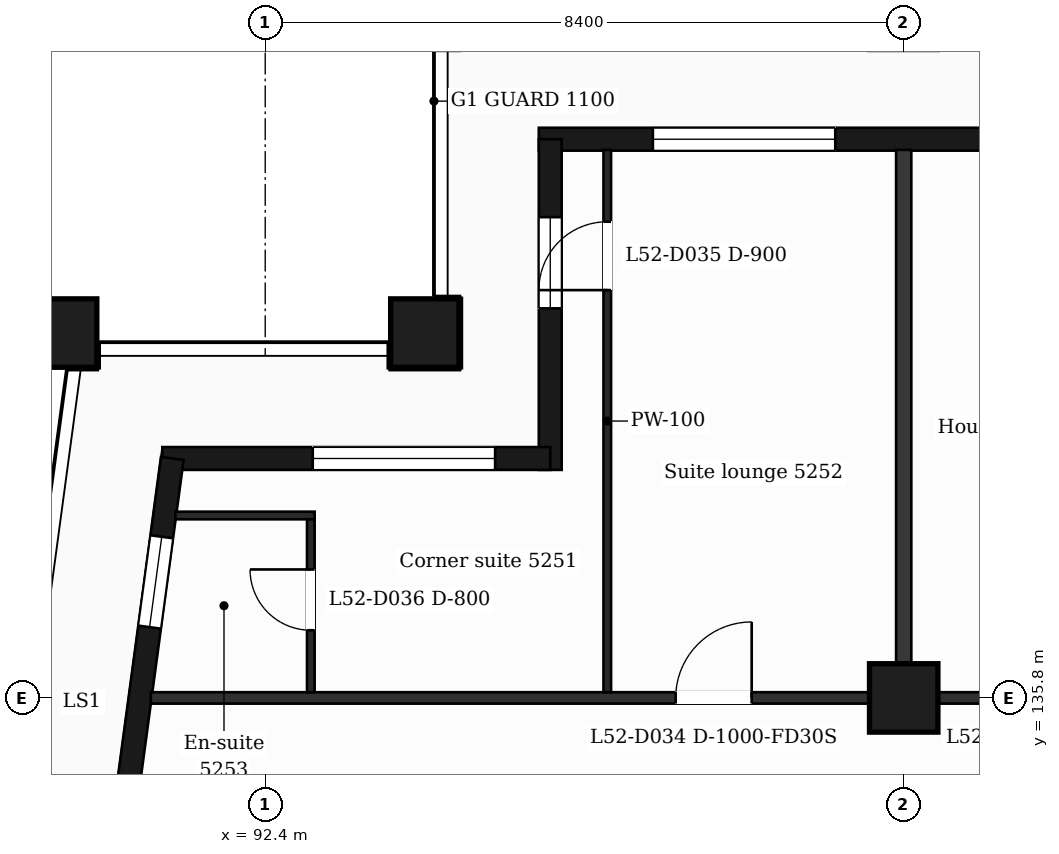
"""IFC4 building model, lengths in metres.
Left out: names, types, materials, properties, quantities, classifications, styles, units other than length and angle.
Written with IfcOpenShell. Run it as: python <this file> out.ifc"""

import sys

from ifc_helpers import new_model, si_unit, direction, frame, frame_2d, origin, origin_2d, place, context, subcontext, project, spatial, rectangle, extrude, element, fill, save


model = new_model("IFC4")
c1 = context("Model", 3, precision=1e-05, world=origin(), true_north=direction((0.0, 1.0)))
c2 = subcontext(c1, "Body", "Model", "MODEL_VIEW")
j1 = project(units=[si_unit("LENGTHUNIT", "METRE"), si_unit("PLANEANGLEUNIT", "RADIAN")], contexts=[c1])
p1 = place(None, origin())
s1 = spatial("IfcSite", under=j1, at=p1, CompositionType="ELEMENT")
p2 = place(p1, origin())
s2 = spatial("IfcBuilding", under=s1, at=p2, CompositionType="ELEMENT")
p3 = place(p2, frame((0.0, 0.0, 217.0)))
s3 = spatial("IfcBuildingStorey", under=s2, at=p3, CompositionType="ELEMENT", Elevation=217.0)
for number, where, z_axis, x_axis in (
    (1, (94.5, 140.6, 0.0), (0.0, 0.0, 1.0), (1.0, 0.0, 0.0)),
    (2, (89.735, 140.6, 0.0), (0.0, 0.0, 1.0), (1.0, 0.0, 0.0)),
    (3, (100.8, 135.8, 0.0), (0.0, 0.0, 1.0), (1.0, 0.0, 0.0)),
):
    element("IfcColumn", number, at=place(p3, frame(where, z_axis=z_axis, x_axis=x_axis)), inside=s3, PredefinedType="COLUMN", context=c2, shape_type="SweptSolid", body=[
        extrude(rectangle(XDim=0.9, YDim=0.9, at=origin_2d()), origin(), (0.0, 0.0, 1.0), 3.7),
    ])
p4 = place(p3, frame((110.4, 143.15, 0.0), z_axis=(0.0, 0.0, 1.0), x_axis=(-1.0, 0.0, 0.0)))
e4 = element("IfcWall", 4, at=p4, inside=s3, PredefinedType="SOLIDWALL", context=c2, shape_type="SweptSolid", body=[
    extrude(rectangle(XDim=14.4, YDim=0.3, at=frame_2d((7.2, 0.0))), origin(), (0.0, 0.0, 1.0), 3.38),
])
p5 = place(p4, frame((2.7, 0.0, 0.9)))
e5 = element("IfcOpeningElement", 5, at=p5, cuts=e4, PredefinedType="OPENING", context=c2, shape_type="SweptSolid", body=[
    extrude(rectangle(XDim=1.2, YDim=2.1, at=frame_2d((0.6, 1.05))), frame((0.0, 0.16, 0.0), z_axis=(0.0, -1.0, 0.0), x_axis=(1.0, 0.0, 0.0)), (0.0, 0.0, 1.0), 0.32),
])
p6 = place(p4, frame((6.9, 0.0, 0.0)))
e6 = element("IfcOpeningElement", 6, at=p6, cuts=e4, PredefinedType="OPENING", context=c2, shape_type="SweptSolid", body=[
    extrude(rectangle(XDim=1.2, YDim=2.4, at=frame_2d((0.6, 1.2))), frame((0.0, 0.16, 0.0), z_axis=(0.0, -1.0, 0.0), x_axis=(1.0, 0.0, 0.0)), (0.0, 0.0, 1.0), 0.32),
])
p7 = place(p4, frame((10.5, 0.0, 0.9)))
e7 = element("IfcOpeningElement", 7, at=p7, cuts=e4, PredefinedType="OPENING", context=c2, shape_type="SweptSolid", body=[
    extrude(rectangle(XDim=2.4, YDim=2.1, at=frame_2d((1.2, 1.05))), frame((0.0, 0.16, 0.0), z_axis=(0.0, -1.0, 0.0), x_axis=(1.0, 0.0, 0.0)), (0.0, 0.0, 1.0), 0.32),
])
p8 = place(p3, frame((96.15, 143.15, 0.0), z_axis=(0.0, 0.0, 1.0), x_axis=(0.0, -1.0, 0.0)))
e8 = element("IfcWall", 8, at=p8, inside=s3, PredefinedType="SOLIDWALL", context=c2, shape_type="SweptSolid", body=[
    extrude(rectangle(XDim=4.35, YDim=0.3, at=frame_2d((2.175, 0.0))), origin(), (0.0, 0.0, 1.0), 3.38),
])
p9 = place(p8, frame((1.025, 0.0, 0.9)))
e9 = element("IfcOpeningElement", 9, at=p9, cuts=e8, PredefinedType="OPENING", context=c2, shape_type="SweptSolid", body=[
    extrude(rectangle(XDim=1.2, YDim=2.1, at=frame_2d((0.6, 1.05))), frame((0.0, 0.16, 0.0), z_axis=(0.0, -1.0, 0.0), x_axis=(1.0, 0.0, 0.0)), (0.0, 0.0, 1.0), 0.32),
])
p10 = place(p3, frame((96.15, 138.95, 0.0), z_axis=(0.0, 0.0, 1.0), x_axis=(-1.0, 0.0, 0.0)))
e10 = element("IfcWall", 10, at=p10, inside=s3, PredefinedType="SOLIDWALL", context=c2, shape_type="SweptSolid", body=[
    extrude(rectangle(XDim=5.104, YDim=0.3, at=frame_2d((2.552, 0.0))), origin(), (0.0, 0.0, 1.0), 3.38),
])
p11 = place(p10, frame((0.725, 0.0, 0.9)))
e11 = element("IfcOpeningElement", 11, at=p11, cuts=e10, PredefinedType="OPENING", context=c2, shape_type="SweptSolid", body=[
    extrude(rectangle(XDim=2.4, YDim=2.1, at=frame_2d((1.2, 1.05))), frame((0.0, 0.16, 0.0), z_axis=(0.0, -1.0, 0.0), x_axis=(1.0, 0.0, 0.0)), (0.0, 0.0, 1.0), 0.32),
])
p12 = place(p3, frame((91.177, 138.95, 0.0), z_axis=(0.0, 0.0, 1.0), x_axis=(-0.133426664613, -0.991058689065, 0.0)))
e12 = element("IfcWall", 12, at=p12, inside=s3, PredefinedType="SOLIDWALL", context=c2, shape_type="SweptSolid", body=[
    extrude(rectangle(XDim=6.609, YDim=0.3, at=frame_2d((3.305, 0.0))), origin(), (0.0, 0.0, 1.0), 3.38),
])
p13 = place(p12, frame((1.039, 0.0, 0.9)))
e13 = element("IfcOpeningElement", 13, at=p13, cuts=e12, PredefinedType="OPENING", context=c2, shape_type="SweptSolid", body=[
    extrude(rectangle(XDim=1.2, YDim=2.1, at=frame_2d((0.6, 1.05))), frame((0.0, 0.16, 0.0), z_axis=(0.0, -1.0, 0.0), x_axis=(1.0, 0.0, 0.0)), (0.0, 0.0, 1.0), 0.32),
])
p14 = place(p12, frame((4.294, 0.0, 0.0)))
e14 = element("IfcOpeningElement", 14, at=p14, cuts=e12, PredefinedType="OPENING", context=c2, shape_type="SweptSolid", body=[
    extrude(rectangle(XDim=1.2, YDim=2.4, at=frame_2d((0.6, 1.2))), frame((0.0, 0.16, 0.0), z_axis=(0.0, -1.0, 0.0), x_axis=(1.0, 0.0, 0.0)), (0.0, 0.0, 1.0), 0.32),
])
p15 = place(p3, frame((90.895, 135.8, 0.0), z_axis=(0.0, 0.0, 1.0), x_axis=(1.0, 0.0, 0.0)))
e15 = element("IfcWall", 15, at=p15, inside=s3, PredefinedType="PARTITIONING", context=c2, shape_type="SweptSolid", body=[
    extrude(rectangle(XDim=45.011, YDim=0.15, at=frame_2d((22.505, 0.0))), origin(), (0.0, 0.0, 1.0), 3.38),
])
p16 = place(p15, frame((6.906, 0.0, 0.0)))
e16 = element("IfcOpeningElement", 16, at=p16, cuts=e15, PredefinedType="OPENING", context=c2, shape_type="SweptSolid", body=[
    extrude(rectangle(XDim=1.0, YDim=2.1, at=frame_2d((0.5, 1.05))), frame((0.0, 0.085, 0.0), z_axis=(0.0, -1.0, 0.0), x_axis=(1.0, 0.0, 0.0)), (0.0, 0.0, 1.0), 0.17),
])
p17 = place(p15, frame((11.531, 0.0, 0.0)))
e17 = element("IfcOpeningElement", 17, at=p17, cuts=e15, PredefinedType="OPENING", context=c2, shape_type="SweptSolid", body=[
    extrude(rectangle(XDim=0.95, YDim=2.1, at=frame_2d((0.475, 1.05))), frame((0.0, 0.085, 0.0), z_axis=(0.0, -1.0, 0.0), x_axis=(1.0, 0.0, 0.0)), (0.0, 0.0, 1.0), 0.17),
])
p18 = place(p15, frame((16.667, 0.0, 0.0)))
e18 = element("IfcOpeningElement", 18, at=p18, cuts=e15, PredefinedType="OPENING", context=c2, shape_type="SweptSolid", body=[
    extrude(rectangle(XDim=0.95, YDim=2.1, at=frame_2d((0.475, 1.05))), frame((0.0, 0.085, 0.0), z_axis=(0.0, -1.0, 0.0), x_axis=(1.0, 0.0, 0.0)), (0.0, 0.0, 1.0), 0.17),
])
p19 = place(p15, frame((21.281, 0.0, 0.0)))
e19 = element("IfcOpeningElement", 19, at=p19, cuts=e15, PredefinedType="OPENING", context=c2, shape_type="SweptSolid", body=[
    extrude(rectangle(XDim=0.95, YDim=2.1, at=frame_2d((0.475, 1.05))), frame((0.0, 0.085, 0.0), z_axis=(0.0, -1.0, 0.0), x_axis=(1.0, 0.0, 0.0)), (0.0, 0.0, 1.0), 0.17),
])
p20 = place(p15, frame((28.73, 0.0, 0.0)))
e20 = element("IfcOpeningElement", 20, at=p20, cuts=e15, PredefinedType="OPENING", context=c2, shape_type="SweptSolid", body=[
    extrude(rectangle(XDim=1.0, YDim=2.1, at=frame_2d((0.5, 1.05))), frame((0.0, 0.085, 0.0), z_axis=(0.0, -1.0, 0.0), x_axis=(1.0, 0.0, 0.0)), (0.0, 0.0, 1.0), 0.17),
])
p21 = place(p15, frame((39.814, 0.0, 0.0)))
e21 = element("IfcOpeningElement", 21, at=p21, cuts=e15, PredefinedType="OPENING", context=c2, shape_type="SweptSolid", body=[
    extrude(rectangle(XDim=0.95, YDim=2.1, at=frame_2d((0.475, 1.05))), frame((0.0, 0.085, 0.0), z_axis=(0.0, -1.0, 0.0), x_axis=(1.0, 0.0, 0.0)), (0.0, 0.0, 1.0), 0.17),
])
p22 = place(p3, frame((91.218, 138.2, 0.0), z_axis=(0.0, 0.0, 1.0), x_axis=(1.0, 0.0, 0.0)))
e22 = element("IfcWall", 22, at=p22, inside=s3, PredefinedType="PARTITIONING", context=c2, shape_type="SweptSolid", body=[
    extrude(rectangle(XDim=1.832, YDim=0.1, at=frame_2d((0.916, 0.0))), origin(), (0.0, 0.0, 1.0), 3.38),
])
p23 = place(p3, frame((93.0, 135.875, 0.0), z_axis=(0.0, 0.0, 1.0), x_axis=(0.0, 1.0, 0.0)))
e23 = element("IfcWall", 23, at=p23, inside=s3, PredefinedType="PARTITIONING", context=c2, shape_type="SweptSolid", body=[
    extrude(rectangle(XDim=2.275, YDim=0.1, at=frame_2d((1.137, 0.0))), origin(), (0.0, 0.0, 1.0), 3.38),
])
p24 = place(p23, frame((0.815, 0.0, 0.0)))
e24 = element("IfcOpeningElement", 24, at=p24, cuts=e23, PredefinedType="OPENING", context=c2, shape_type="SweptSolid", body=[
    extrude(rectangle(XDim=0.8, YDim=2.1, at=frame_2d((0.4, 1.05))), frame((0.0, 0.06, 0.0), z_axis=(0.0, -1.0, 0.0), x_axis=(1.0, 0.0, 0.0)), (0.0, 0.0, 1.0), 0.12),
])
p25 = place(p3, frame((96.9, 135.875, 0.0), z_axis=(0.0, 0.0, 1.0), x_axis=(0.0, 1.0, 0.0)))
e25 = element("IfcWall", 25, at=p25, inside=s3, PredefinedType="PARTITIONING", context=c2, shape_type="SweptSolid", body=[
    extrude(rectangle(XDim=7.135, YDim=0.1, at=frame_2d((3.567, 0.0))), origin(), (0.0, 0.0, 1.0), 3.38),
])
p26 = place(p25, frame((5.29, 0.0, 0.0)))
e26 = element("IfcOpeningElement", 26, at=p26, cuts=e25, PredefinedType="OPENING", context=c2, shape_type="SweptSolid", body=[
    extrude(rectangle(XDim=0.9, YDim=2.1, at=frame_2d((0.45, 1.05))), frame((0.0, 0.06, 0.0), z_axis=(0.0, -1.0, 0.0), x_axis=(1.0, 0.0, 0.0)), (0.0, 0.0, 1.0), 0.12),
])
p27 = place(p3, frame((100.8, 135.875, 0.0), z_axis=(0.0, 0.0, 1.0), x_axis=(0.0, 1.0, 0.0)))
e27 = element("IfcWall", 27, at=p27, inside=s3, PredefinedType="PARTITIONING", context=c2, shape_type="SweptSolid", body=[
    extrude(rectangle(XDim=7.135, YDim=0.2, at=frame_2d((3.567, 0.0))), origin(), (0.0, 0.0, 1.0), 3.38),
])
p28 = place(p7, origin())
e28 = element("IfcWindow", 28, at=p28, inside=s3, PartitioningType="SINGLE_PANEL", PredefinedType="WINDOW", context=c2, shape_type="SweptSolid", body=[
    extrude(rectangle(XDim=2.4, YDim=2.1, at=frame_2d((1.2, 1.05))), frame((0.0, 0.03, 0.0), z_axis=(0.0, -1.0, 0.0), x_axis=(1.0, 0.0, 0.0)), (0.0, 0.0, 1.0), 0.06),
])
fill(e7, e28)
p29 = place(p9, origin())
e29 = element("IfcWindow", 29, at=p29, inside=s3, PartitioningType="SINGLE_PANEL", PredefinedType="WINDOW", context=c2, shape_type="SweptSolid", body=[
    extrude(rectangle(XDim=1.2, YDim=2.1, at=frame_2d((0.6, 1.05))), frame((0.0, 0.03, 0.0), z_axis=(0.0, -1.0, 0.0), x_axis=(1.0, 0.0, 0.0)), (0.0, 0.0, 1.0), 0.06),
])
fill(e9, e29)
p30 = place(p11, origin())
e30 = element("IfcWindow", 30, at=p30, inside=s3, PartitioningType="SINGLE_PANEL", PredefinedType="WINDOW", context=c2, shape_type="SweptSolid", body=[
    extrude(rectangle(XDim=2.4, YDim=2.1, at=frame_2d((1.2, 1.05))), frame((0.0, 0.03, 0.0), z_axis=(0.0, -1.0, 0.0), x_axis=(1.0, 0.0, 0.0)), (0.0, 0.0, 1.0), 0.06),
])
fill(e11, e30)
p31 = place(p13, origin())
e31 = element("IfcWindow", 31, at=p31, inside=s3, PartitioningType="SINGLE_PANEL", PredefinedType="WINDOW", context=c2, shape_type="SweptSolid", body=[
    extrude(rectangle(XDim=1.2, YDim=2.1, at=frame_2d((0.6, 1.05))), frame((0.0, 0.03, 0.0), z_axis=(0.0, -1.0, 0.0), x_axis=(1.0, 0.0, 0.0)), (0.0, 0.0, 1.0), 0.06),
])
fill(e13, e31)
p32 = place(p16, origin())
e32 = element("IfcDoor", 32, at=p32, inside=s3, OperationType="SINGLE_SWING_RIGHT", PredefinedType="DOOR", context=c2, shape_type="SweptSolid", body=[
    extrude(rectangle(XDim=1.0, YDim=2.1, at=frame_2d((0.5, 1.05))), frame((0.0, 0.025, 0.0), z_axis=(0.0, -1.0, 0.0), x_axis=(1.0, 0.0, 0.0)), (0.0, 0.0, 1.0), 0.05),
])
fill(e16, e32)
p33 = place(p26, origin())
e33 = element("IfcDoor", 33, at=p33, inside=s3, OperationType="SINGLE_SWING_LEFT", PredefinedType="DOOR", context=c2, shape_type="SweptSolid", body=[
    extrude(rectangle(XDim=0.9, YDim=2.1, at=frame_2d((0.45, 1.05))), frame((0.0, 0.025, 0.0), z_axis=(0.0, -1.0, 0.0), x_axis=(1.0, 0.0, 0.0)), (0.0, 0.0, 1.0), 0.05),
])
fill(e26, e33)
p34 = place(p24, origin())
e34 = element("IfcDoor", 34, at=p34, inside=s3, OperationType="SINGLE_SWING_RIGHT", PredefinedType="DOOR", context=c2, shape_type="SweptSolid", body=[
    extrude(rectangle(XDim=0.8, YDim=2.1, at=frame_2d((0.4, 1.05))), frame((0.0, 0.025, 0.0), z_axis=(0.0, -1.0, 0.0), x_axis=(1.0, 0.0, 0.0)), (0.0, 0.0, 1.0), 0.05),
])
fill(e24, e34)
save(model, sys.argv[1])
